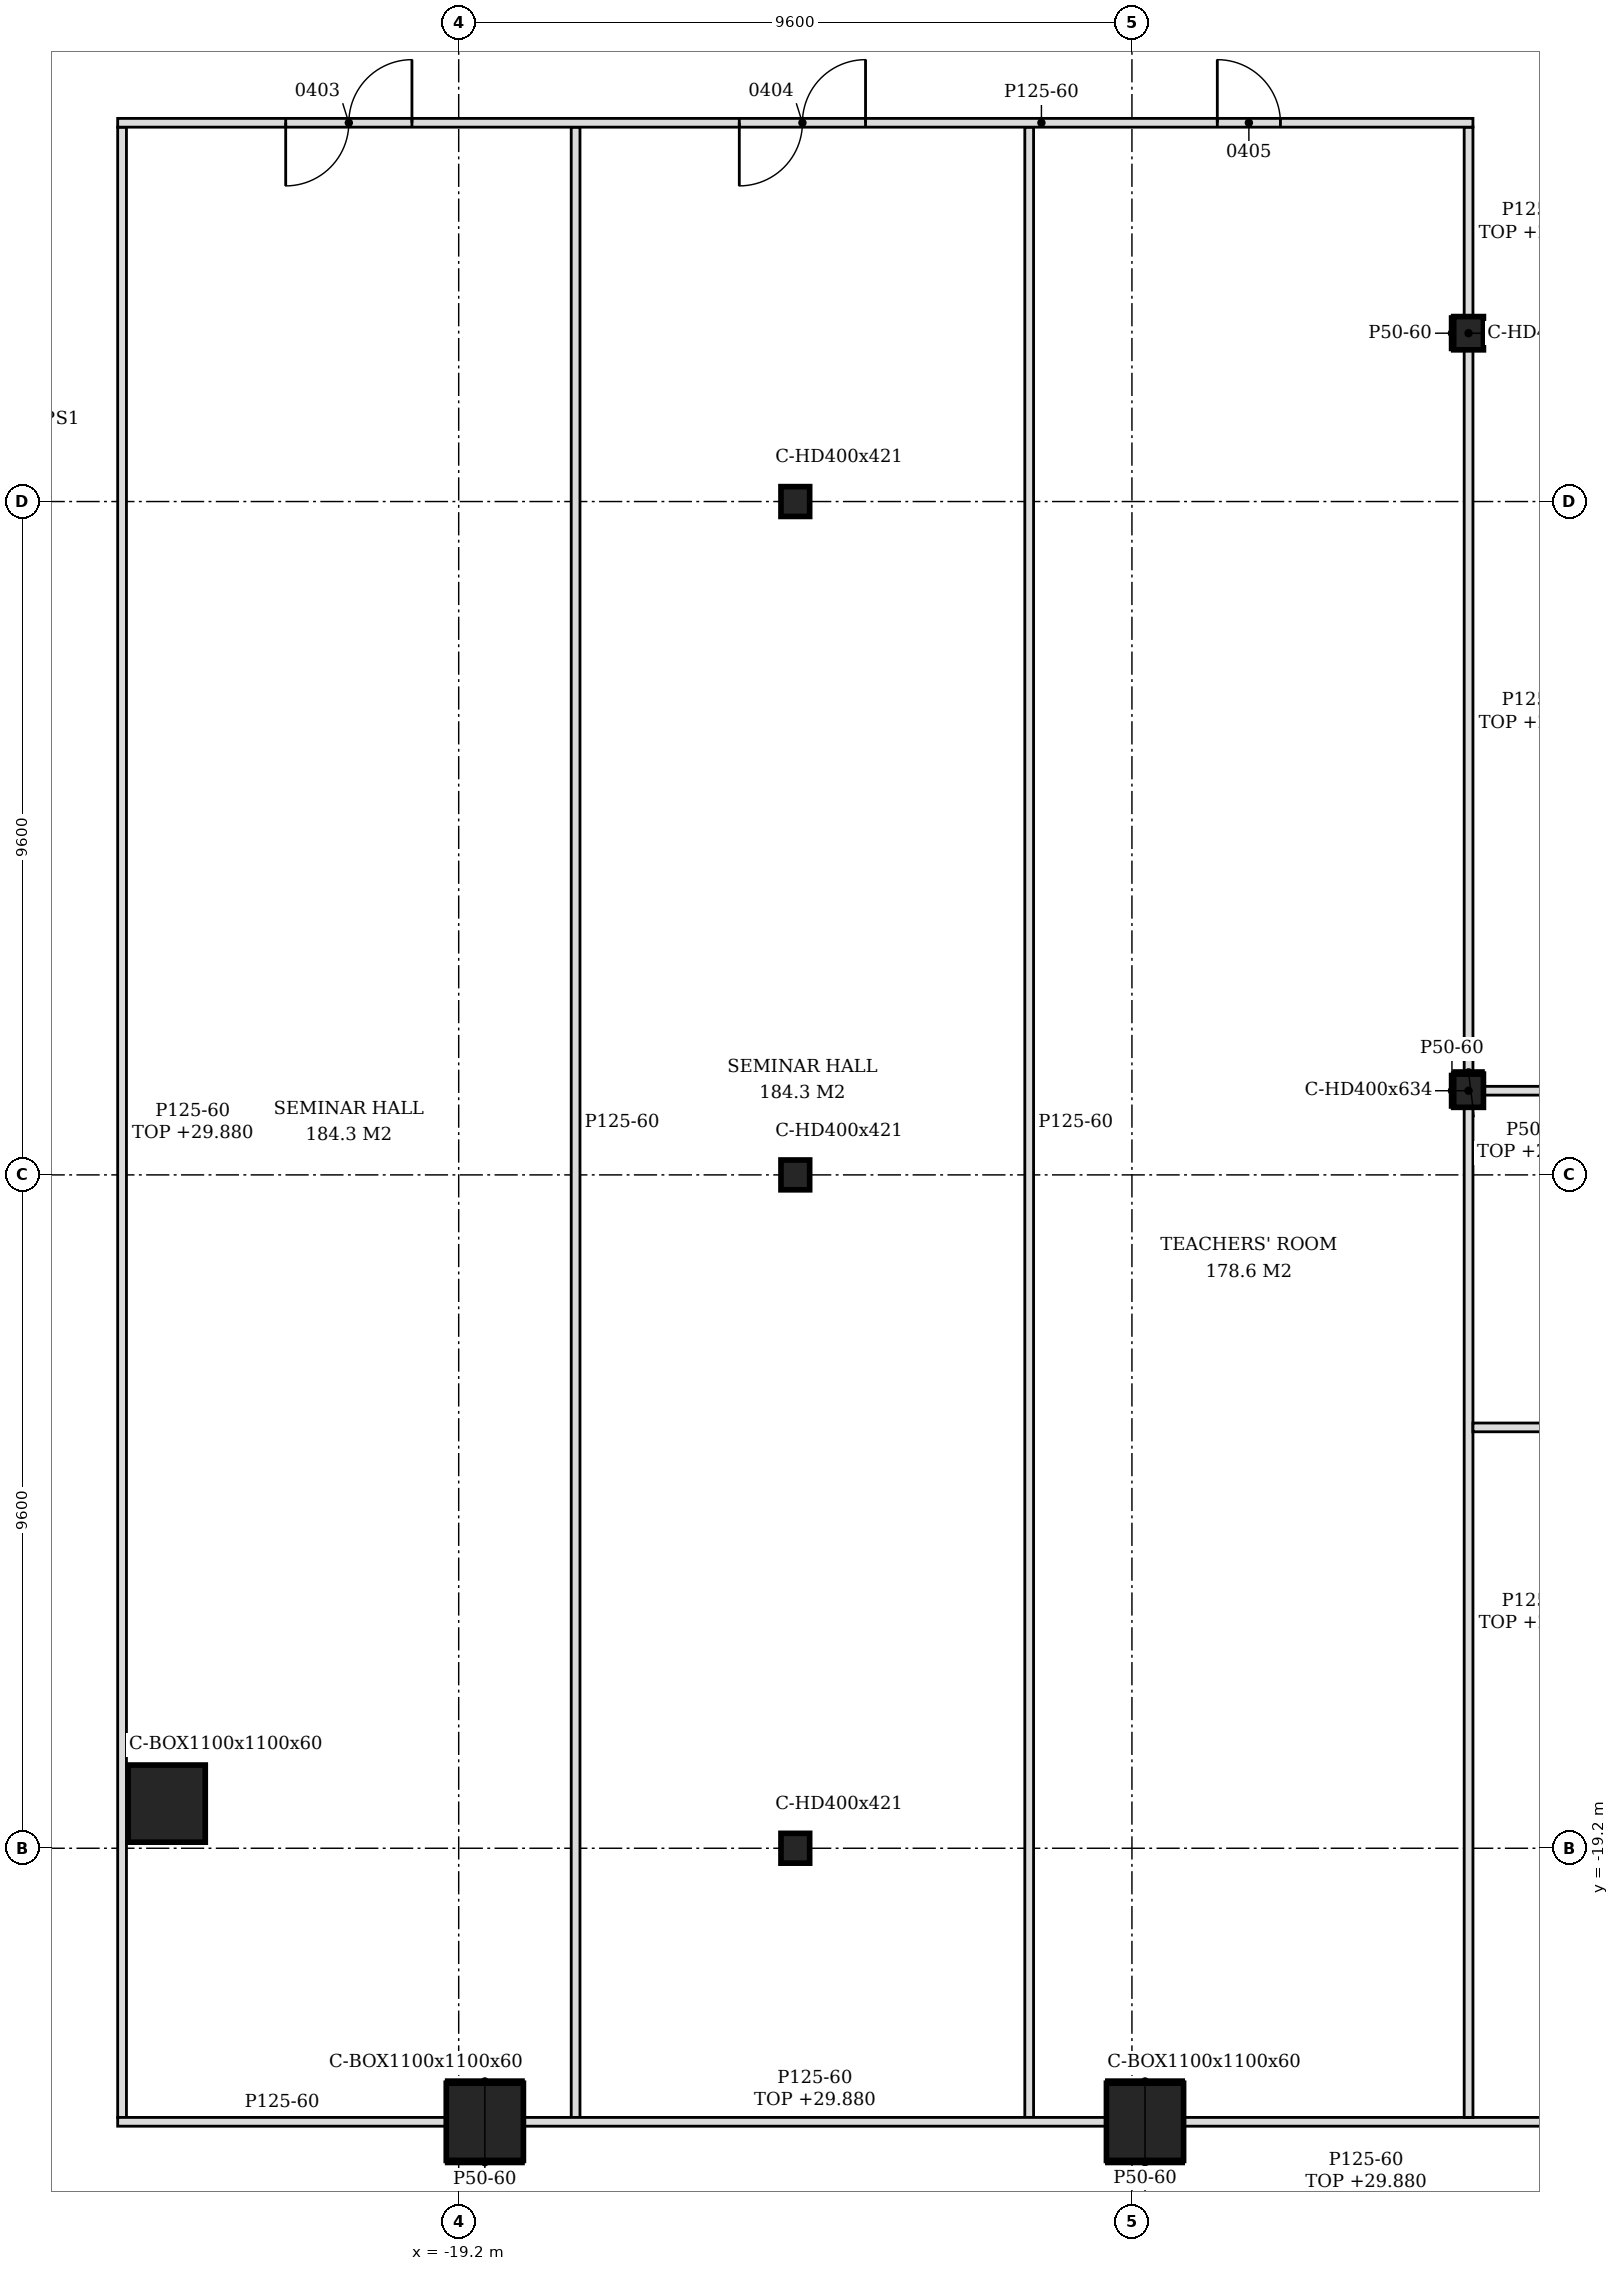
"""IFC4 building model, lengths in metres.
Left out: names, types, materials, properties, quantities, classifications, styles, units other than length and angle.
Written with IfcOpenShell. Run it as: python <this file> out.ifc"""

import sys

from ifc_helpers import new_model, si_unit, direction, frame, frame_2d, origin, origin_2d, place, context, subcontext, project, spatial, polyline, rectangle, hollow_rectangle, i_section, outline, extrude, element, fill, save


model = new_model("IFC4")
c1 = context("Model", 3, precision=1e-05, world=origin(), true_north=direction((0.0, 1.0)))
c2 = subcontext(c1, "Body", "Model", "MODEL_VIEW")
j1 = project(units=[si_unit("LENGTHUNIT", "METRE"), si_unit("PLANEANGLEUNIT", "RADIAN")], contexts=[c1])
p1 = place(None, origin())
s1 = spatial("IfcSite", under=j1, at=p1, CompositionType="ELEMENT")
p2 = place(p1, origin())
s2 = spatial("IfcBuilding", under=s1, at=p2, CompositionType="ELEMENT")
p3 = place(p2, frame((0.0, 0.0, 25.8)))
s3 = spatial("IfcBuildingStorey", under=s2, at=p3, CompositionType="ELEMENT", Elevation=25.8)
for number, where, z_axis, x_axis in (
    (1, (-18.827, -23.1, -0.2), (0.0, 0.0, 1.0), (1.0, 0.0, 0.0)),
    (2, (-9.414, -23.1, -0.2), (0.0, 0.0, 1.0), (1.0, 0.0, 0.0)),
    (3, (-23.364, -18.564, -0.2), (0.0, 0.0, 1.0), (1.0, 0.0, 0.0)),
):
    element("IfcColumn", number, at=place(p3, frame(where, z_axis=z_axis, x_axis=x_axis)), inside=s3, PredefinedType="COLUMN", context=c2, shape_type="SweptSolid", body=[
        extrude(hollow_rectangle(XDim=1.1, YDim=1.1, WallThickness=0.06, at=origin_2d()), origin(), (0.0, 0.0, 1.0), 4.8),
    ])
for number, where, z_axis, x_axis in (
    (4, (-4.8, -8.4, -0.2), (0.0, 0.0, 1.0), (1.0, 0.0, 0.0)),
    (5, (-4.8, 2.4, -0.2), (0.0, 0.0, 1.0), (1.0, 0.0, 0.0)),
):
    element("IfcColumn", number, at=place(p3, frame(where, z_axis=z_axis, x_axis=x_axis)), inside=s3, PredefinedType="COLUMN", context=c2, shape_type="SweptSolid", body=[
        extrude(i_section(OverallWidth=0.424, OverallDepth=0.474, WebThickness=0.048, FlangeThickness=0.077, FilletRadius=0.015, at=origin_2d()), origin(), (0.0, 0.0, 1.0), 4.8),
    ])
for number, where, z_axis, x_axis in (
    (6, (-14.4, -19.2, -0.2), (0.0, 0.0, 1.0), (1.0, 0.0, 0.0)),
    (7, (-14.4, -9.6, -0.2), (0.0, 0.0, 1.0), (1.0, 0.0, 0.0)),
    (8, (-14.4, 0.0, -0.2), (0.0, 0.0, 1.0), (1.0, 0.0, 0.0)),
):
    element("IfcColumn", number, at=place(p3, frame(where, z_axis=z_axis, x_axis=x_axis)), inside=s3, PredefinedType="COLUMN", context=c2, shape_type="SweptSolid", body=[
        extrude(i_section(OverallWidth=0.409, OverallDepth=0.425, WebThickness=0.033, FlangeThickness=0.052, FilletRadius=0.015, at=origin_2d()), origin(), (0.0, 0.0, 1.0), 4.8),
    ])
p4 = place(p3, frame((-24.062, -23.1, 0.0), z_axis=(0.0, 0.0, 1.0), x_axis=(1.0, 0.0, 0.0)))
e9 = element("IfcWall", 9, at=p4, inside=s3, PredefinedType="PARTITIONING", context=c2, shape_type="SweptSolid", body=[
    extrude(rectangle(XDim=4.685, YDim=0.125, at=frame_2d((2.343, 0.0))), origin(), (0.0, 0.0, 1.0), 4.6),
])
p5 = place(p3, frame((-18.277, -23.1, 0.0), z_axis=(0.0, 0.0, 1.0), x_axis=(1.0, 0.0, 0.0)))
e10 = element("IfcWall", 10, at=p5, inside=s3, PredefinedType="PARTITIONING", context=c2, shape_type="SweptSolid", body=[
    extrude(rectangle(XDim=8.313, YDim=0.125, at=frame_2d((4.157, 0.0))), origin(), (0.0, 0.0, 1.0), 4.08),
])
p6 = place(p3, frame((-8.864, -23.1, 0.0), z_axis=(0.0, 0.0, 1.0), x_axis=(1.0, 0.0, 0.0)))
e11 = element("IfcWall", 11, at=p6, inside=s3, PredefinedType="PARTITIONING", context=c2, shape_type="SweptSolid", body=[
    extrude(rectangle(XDim=8.313, YDim=0.125, at=frame_2d((4.157, 0.0))), origin(), (0.0, 0.0, 1.0), 4.08),
])
p7 = place(p6, frame((6.614, 0.0, 0.0)))
e12 = element("IfcOpeningElement", 12, at=p7, cuts=e11, PredefinedType="OPENING", context=c2, shape_type="SweptSolid", body=[
    extrude(rectangle(XDim=0.9, YDim=2.1, at=frame_2d((0.45, 1.05))), frame((0.0, 0.073, 0.0), z_axis=(0.0, -1.0, 0.0), x_axis=(1.0, 0.0, 0.0)), (0.0, 0.0, 1.0), 0.145),
])
p8 = place(p3, frame((-24.0, -23.038, 0.0), z_axis=(0.0, 0.0, 1.0), x_axis=(0.0, 1.0, 0.0)))
e13 = element("IfcWall", 13, at=p8, inside=s3, PredefinedType="PARTITIONING", context=c2, shape_type="SweptSolid", body=[
    extrude(outline(polyline([(0.0, 0.0), (28.375, 0.0), (28.375, 4.08), (23.188, 4.08), (23.186, 3.88), (22.887, 3.88), (22.885, 4.08), (13.587, 4.08), (13.585, 3.88), (13.288, 3.88), (13.285, 4.08), (3.988, 4.08), (3.986, 3.98), (3.688, 3.98), (3.686, 4.08), (0.0, 4.08), (0.0, 0.0)])), frame((0.0, 0.062, 0.0), z_axis=(0.0, -1.0, 0.0), x_axis=(1.0, 0.0, 0.0)), (0.0, 0.0, 1.0), 0.125),
])
p9 = place(p3, frame((-17.533, -23.038, 0.0), z_axis=(0.0, 0.0, 1.0), x_axis=(0.0, 1.0, 0.0)))
e14 = element("IfcWall", 14, at=p9, inside=s3, PredefinedType="PARTITIONING", context=c2, shape_type="SweptSolid", body=[
    extrude(outline(polyline([(0.0, 0.0), (28.375, 0.0), (28.375, 4.6), (23.188, 4.6), (23.186, 3.88), (22.887, 3.88), (22.885, 4.6), (13.587, 4.6), (13.585, 3.88), (13.288, 3.88), (13.285, 4.6), (0.087, 4.6), (0.085, 4.08), (0.0, 4.08), (0.0, 0.0)])), frame((0.0, 0.062, 0.0), z_axis=(0.0, -1.0, 0.0), x_axis=(1.0, 0.0, 0.0)), (0.0, 0.0, 1.0), 0.125),
])
p10 = place(p3, frame((-11.065, -23.038, 0.0), z_axis=(0.0, 0.0, 1.0), x_axis=(0.0, 1.0, 0.0)))
e15 = element("IfcWall", 15, at=p10, inside=s3, PredefinedType="PARTITIONING", context=c2, shape_type="SweptSolid", body=[
    extrude(outline(polyline([(0.0, 0.0), (28.375, 0.0), (28.375, 4.6), (23.188, 4.6), (23.186, 4.08), (22.887, 4.08), (22.885, 4.6), (0.087, 4.6), (0.085, 4.08), (0.0, 4.08), (0.0, 0.0)])), frame((0.0, 0.062, 0.0), z_axis=(0.0, -1.0, 0.0), x_axis=(1.0, 0.0, 0.0)), (0.0, 0.0, 1.0), 0.125),
])
p11 = place(p3, frame((-4.8, -23.038, 0.0), z_axis=(0.0, 0.0, 1.0), x_axis=(0.0, 1.0, 0.0)))
e16 = element("IfcWall", 16, at=p11, inside=s3, PredefinedType="PARTITIONING", context=c2, shape_type="SweptSolid", body=[
    extrude(rectangle(XDim=14.401, YDim=0.125, at=frame_2d((7.2, 0.0))), origin(), (0.0, 0.0, 1.0), 3.98),
])
p12 = place(p3, frame((-4.738, -13.2, 0.0), z_axis=(0.0, 0.0, 1.0), x_axis=(1.0, 0.0, 0.0)))
e17 = element("IfcWall", 17, at=p12, inside=s3, PredefinedType="PARTITIONING", context=c2, shape_type="SweptSolid", body=[
    extrude(outline(polyline([(0.0, 0.0), (23.875, 0.0), (23.875, 3.98), (23.788, 3.98), (23.785, 4.6), (19.288, 4.6), (19.285, 3.98), (18.988, 3.98), (18.986, 4.6), (14.488, 4.6), (14.486, 3.98), (14.188, 3.98), (14.186, 4.6), (9.688, 4.6), (9.686, 3.98), (9.387, 3.98), (9.385, 4.6), (4.887, 4.6), (4.885, 3.98), (4.587, 3.98), (4.585, 4.6), (0.087, 4.6), (0.085, 3.98), (0.0, 3.98), (0.0, 0.0)])), frame((0.0, 0.062, 0.0), z_axis=(0.0, -1.0, 0.0), x_axis=(1.0, 0.0, 0.0)), (0.0, 0.0, 1.0), 0.125),
])
p13 = place(p3, frame((-4.588, -8.4, 0.0), z_axis=(0.0, 0.0, 1.0), x_axis=(1.0, 0.0, 0.0)))
e18 = element("IfcWall", 18, at=p13, inside=s3, PredefinedType="PARTITIONING", context=c2, shape_type="SweptSolid", body=[
    extrude(rectangle(XDim=11.576, YDim=0.125, at=frame_2d((5.788, 0.0))), origin(), (0.0, 0.0, 1.0), 3.98),
])
p14 = place(p13, frame((5.388, 0.0, 0.0)))
e19 = element("IfcOpeningElement", 19, at=p14, cuts=e18, PredefinedType="OPENING", context=c2, shape_type="SweptSolid", body=[
    extrude(rectangle(XDim=0.8, YDim=2.1, at=frame_2d((0.4, 1.05))), frame((0.0, 0.073, 0.0), z_axis=(0.0, -1.0, 0.0), x_axis=(1.0, 0.0, 0.0)), (0.0, 0.0, 1.0), 0.145),
])
p15 = place(p3, frame((-4.8, -8.163, 0.0), z_axis=(0.0, 0.0, 1.0), x_axis=(0.0, 1.0, 0.0)))
e20 = element("IfcWall", 20, at=p15, inside=s3, PredefinedType="PARTITIONING", context=c2, shape_type="SweptSolid", body=[
    extrude(rectangle(XDim=10.326, YDim=0.125, at=frame_2d((5.163, 0.0))), origin(), (0.0, 0.0, 1.0), 3.98),
])
p16 = place(p3, frame((-4.8, 2.637, 0.0), z_axis=(0.0, 0.0, 1.0), x_axis=(0.0, 1.0, 0.0)))
e21 = element("IfcWall", 21, at=p16, inside=s3, PredefinedType="PARTITIONING", context=c2, shape_type="SweptSolid", body=[
    extrude(rectangle(XDim=2.7, YDim=0.125, at=frame_2d((1.35, 0.0))), origin(), (0.0, 0.0, 1.0), 3.98),
])
p17 = place(p3, frame((-24.062, 5.4, 0.0), z_axis=(0.0, 0.0, 1.0), x_axis=(1.0, 0.0, 0.0)))
e22 = element("IfcWall", 22, at=p17, inside=s3, PredefinedType="PARTITIONING", context=c2, shape_type="SweptSolid", body=[
    extrude(outline(polyline([(0.0, 0.0), (19.325, 0.0), (19.325, 3.98), (19.113, 3.98), (19.111, 4.6), (14.562, 4.6), (14.561, 4.08), (14.363, 4.08), (14.361, 4.6), (9.762, 4.6), (9.76, 4.08), (9.562, 4.08), (9.561, 4.6), (4.962, 4.6), (4.96, 4.08), (4.762, 4.08), (4.76, 4.6), (0.163, 4.6), (0.16, 4.08), (0.0, 4.08), (0.0, 0.0)])), frame((0.0, 0.062, 0.0), z_axis=(0.0, -1.0, 0.0), x_axis=(1.0, 0.0, 0.0)), (0.0, 0.0, 1.0), 0.125),
])
p18 = place(p17, frame((2.396, 0.0, 0.0)))
e23 = element("IfcOpeningElement", 23, at=p18, cuts=e22, PredefinedType="OPENING", context=c2, shape_type="SweptSolid", body=[
    extrude(rectangle(XDim=1.8, YDim=2.1, at=frame_2d((0.9, 1.05))), frame((0.0, 0.073, 0.0), z_axis=(0.0, -1.0, 0.0), x_axis=(1.0, 0.0, 0.0)), (0.0, 0.0, 1.0), 0.145),
])
p19 = place(p17, frame((8.864, 0.0, 0.0)))
e24 = element("IfcOpeningElement", 24, at=p19, cuts=e22, PredefinedType="OPENING", context=c2, shape_type="SweptSolid", body=[
    extrude(rectangle(XDim=1.8, YDim=2.1, at=frame_2d((0.9, 1.05))), frame((0.0, 0.073, 0.0), z_axis=(0.0, -1.0, 0.0), x_axis=(1.0, 0.0, 0.0)), (0.0, 0.0, 1.0), 0.145),
])
p20 = place(p17, frame((15.68, 0.0, 0.0)))
e25 = element("IfcOpeningElement", 25, at=p20, cuts=e22, PredefinedType="OPENING", context=c2, shape_type="SweptSolid", body=[
    extrude(rectangle(XDim=0.9, YDim=2.1, at=frame_2d((0.45, 1.05))), frame((0.0, 0.073, 0.0), z_axis=(0.0, -1.0, 0.0), x_axis=(1.0, 0.0, 0.0)), (0.0, 0.0, 1.0), 0.145),
])
p21 = place(p3, frame((-19.377, -22.525, 0.0), z_axis=(0.0, 0.0, 1.0), x_axis=(1.0, 0.0, 0.0)))
e26 = element("IfcWall", 26, at=p21, inside=s3, PredefinedType="PARTITIONING", context=c2, shape_type="SweptSolid", body=[
    extrude(rectangle(XDim=1.1, YDim=0.05, at=frame_2d((0.55, 0.0))), origin(), (0.0, 0.0, 1.0), 3.98),
])
p22 = place(p3, frame((-19.377, -23.675, 0.0), z_axis=(0.0, 0.0, 1.0), x_axis=(1.0, 0.0, 0.0)))
e27 = element("IfcWall", 27, at=p22, inside=s3, PredefinedType="PARTITIONING", context=c2, shape_type="SweptSolid", body=[
    extrude(rectangle(XDim=1.1, YDim=0.05, at=frame_2d((0.55, 0.0))), origin(), (0.0, 0.0, 1.0), 4.22),
])
p23 = place(p3, frame((-9.964, -22.525, 0.0), z_axis=(0.0, 0.0, 1.0), x_axis=(1.0, 0.0, 0.0)))
e28 = element("IfcWall", 28, at=p23, inside=s3, PredefinedType="PARTITIONING", context=c2, shape_type="SweptSolid", body=[
    extrude(rectangle(XDim=1.1, YDim=0.05, at=frame_2d((0.55, 0.0))), origin(), (0.0, 0.0, 1.0), 4.6),
])
p24 = place(p3, frame((-9.964, -23.675, 0.0), z_axis=(0.0, 0.0, 1.0), x_axis=(1.0, 0.0, 0.0)))
e29 = element("IfcWall", 29, at=p24, inside=s3, PredefinedType="PARTITIONING", context=c2, shape_type="SweptSolid", body=[
    extrude(rectangle(XDim=1.1, YDim=0.05, at=frame_2d((0.55, 0.0))), origin(), (0.0, 0.0, 1.0), 4.22),
])
for number, where, z_axis, x_axis in (
    (30, (-5.037, -8.637, 0.0), (0.0, 0.0, 1.0), (0.0, 1.0, 0.0)),
    (31, (-5.037, 2.163, 0.0), (0.0, 0.0, 1.0), (0.0, 1.0, 0.0)),
):
    element("IfcWall", number, at=place(p3, frame(where, z_axis=z_axis, x_axis=x_axis)), inside=s3, PredefinedType="PARTITIONING", context=c2, shape_type="SweptSolid", body=[
        extrude(rectangle(XDim=0.474, YDim=0.05, at=frame_2d((0.237, 0.0))), origin(), (0.0, 0.0, 1.0), 4.6),
    ])
p25 = place(p3, frame((-5.012, -8.138, 0.0), z_axis=(0.0, 0.0, 1.0), x_axis=(1.0, 0.0, 0.0)))
e32 = element("IfcWall", 32, at=p25, inside=s3, PredefinedType="PARTITIONING", context=c2, shape_type="SweptSolid", body=[
    extrude(rectangle(XDim=0.424, YDim=0.05, at=frame_2d((0.212, 0.0))), origin(), (0.0, 0.0, 1.0), 3.98),
])
p26 = place(p18, origin())
e33 = element("IfcDoor", 33, at=p26, inside=s3, OperationType="DOUBLE_DOOR_SINGLE_SWING", PredefinedType="DOOR", context=c2, shape_type="SweptSolid", body=[
    extrude(rectangle(XDim=1.8, YDim=2.1, at=frame_2d((0.9, 1.05))), frame((0.0, 0.025, 0.0), z_axis=(0.0, -1.0, 0.0), x_axis=(1.0, 0.0, 0.0)), (0.0, 0.0, 1.0), 0.05),
])
fill(e23, e33)
p27 = place(p19, origin())
e34 = element("IfcDoor", 34, at=p27, inside=s3, OperationType="DOUBLE_DOOR_SINGLE_SWING", PredefinedType="DOOR", context=c2, shape_type="SweptSolid", body=[
    extrude(rectangle(XDim=1.8, YDim=2.1, at=frame_2d((0.9, 1.05))), frame((0.0, 0.025, 0.0), z_axis=(0.0, -1.0, 0.0), x_axis=(1.0, 0.0, 0.0)), (0.0, 0.0, 1.0), 0.05),
])
fill(e24, e34)
p28 = place(p20, origin())
e35 = element("IfcDoor", 35, at=p28, inside=s3, OperationType="SINGLE_SWING_LEFT", PredefinedType="DOOR", context=c2, shape_type="SweptSolid", body=[
    extrude(rectangle(XDim=0.9, YDim=2.1, at=frame_2d((0.45, 1.05))), frame((0.0, 0.025, 0.0), z_axis=(0.0, -1.0, 0.0), x_axis=(1.0, 0.0, 0.0)), (0.0, 0.0, 1.0), 0.05),
])
fill(e25, e35)
save(model, sys.argv[1])
